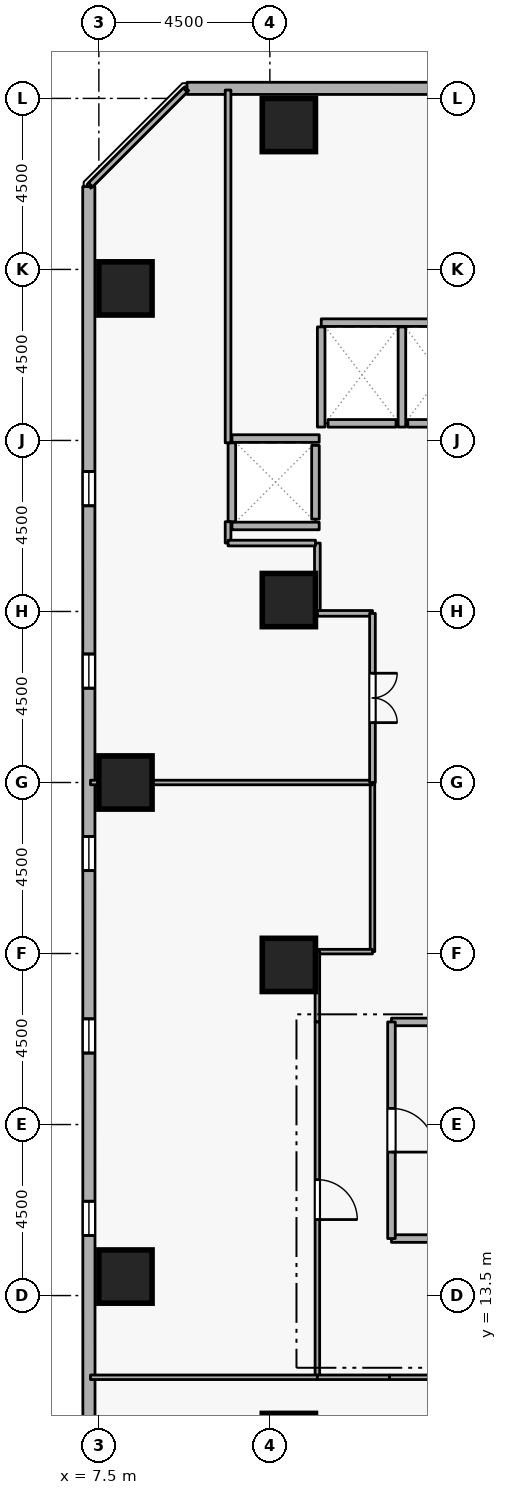
"""IFC4 building model, lengths in metres.
Left out: names, types, materials, properties, quantities, classifications, styles, units other than length and angle.
Written with IfcOpenShell. Run it as: python <this file> out.ifc"""

import sys

from ifc_helpers import new_model, si_unit, direction, frame, frame_2d, origin, origin_2d, place, context, subcontext, project, spatial, rectangle, extrude, element, fill, save


model = new_model("IFC4")
c1 = context("Model", 3, precision=1e-05, world=origin(), true_north=direction((0.0, 1.0)))
c2 = subcontext(c1, "Body", "Model", "MODEL_VIEW")
j1 = project(units=[si_unit("LENGTHUNIT", "METRE"), si_unit("PLANEANGLEUNIT", "RADIAN")], contexts=[c1])
p1 = place(None, origin())
s1 = spatial("IfcSite", under=j1, at=p1, CompositionType="ELEMENT")
p2 = place(p1, origin())
s2 = spatial("IfcBuilding", under=s1, at=p2, CompositionType="ELEMENT")
p3 = place(p2, frame((0.0, 0.0, 53.7)))
s3 = spatial("IfcBuildingStorey", under=s2, at=p3, CompositionType="ELEMENT", Elevation=53.7)
for number, where, z_axis, x_axis in (
    (1, (12.5, 9.7, 0.0), (0.0, 0.0, 1.0), (1.0, 0.0, 0.0)),
    (2, (12.5, 44.3, 0.0), (0.0, 0.0, 1.0), (1.0, 0.0, 0.0)),
    (3, (8.2, 14.0, 0.0), (0.0, 0.0, 1.0), (1.0, 0.0, 0.0)),
    (4, (8.2, 27.0, 0.0), (0.0, 0.0, 1.0), (1.0, 0.0, 0.0)),
    (5, (8.2, 40.0, 0.0), (0.0, 0.0, 1.0), (1.0, 0.0, 0.0)),
    (6, (12.5, 22.2, 0.0), (0.0, 0.0, 1.0), (1.0, 0.0, 0.0)),
    (7, (12.5, 31.8, 0.0), (0.0, 0.0, 1.0), (1.0, 0.0, 0.0)),
):
    element("IfcColumn", number, at=place(p3, frame(where, z_axis=z_axis, x_axis=x_axis)), inside=s3, PredefinedType="COLUMN", context=c2, shape_type="SweptSolid", body=[
        extrude(rectangle(XDim=1.4, YDim=1.4, at=origin_2d()), origin(), (0.0, 0.0, 1.0), 3.6),
    ])
p4 = place(p3, frame((45.877, 45.26, 0.0), z_axis=(0.0, 0.0, 1.0), x_axis=(-0.999999992574, 0.000121872777, 0.0)))
e8 = element("IfcWall", 8, at=p4, inside=s3, PredefinedType="STANDARD", context=c2, shape_type="SweptSolid", body=[
    extrude(rectangle(XDim=36.058, YDim=0.32, at=frame_2d((18.029, 0.0))), origin(), (0.0, 0.0, 1.0), 2.7),
])
p5 = place(p4, frame((2.7, 0.0, 0.72)))
e9 = element("IfcOpeningElement", 9, at=p5, cuts=e8, PredefinedType="OPENING", context=c2, shape_type="SweptSolid", body=[
    extrude(rectangle(XDim=0.9, YDim=1.75, at=frame_2d((0.45, 0.875))), frame((0.0, 0.17, 0.0), z_axis=(0.0, -1.0, 0.0), x_axis=(1.0, 0.0, 0.0)), (0.0, 0.0, 1.0), 0.34),
])
p6 = place(p4, frame((12.3, 0.0, 0.72)))
e10 = element("IfcOpeningElement", 10, at=p6, cuts=e8, PredefinedType="OPENING", context=c2, shape_type="SweptSolid", body=[
    extrude(rectangle(XDim=0.9, YDim=1.75, at=frame_2d((0.45, 0.875))), frame((0.0, 0.17, 0.0), z_axis=(0.0, -1.0, 0.0), x_axis=(1.0, 0.0, 0.0)), (0.0, 0.0, 1.0), 0.34),
])
p7 = place(p4, frame((17.1, 0.0, 0.72)))
e11 = element("IfcOpeningElement", 11, at=p7, cuts=e8, PredefinedType="OPENING", context=c2, shape_type="SweptSolid", body=[
    extrude(rectangle(XDim=0.9, YDim=1.75, at=frame_2d((0.45, 0.875))), frame((0.0, 0.17, 0.0), z_axis=(0.0, -1.0, 0.0), x_axis=(1.0, 0.0, 0.0)), (0.0, 0.0, 1.0), 0.34),
])
p8 = place(p4, frame((21.9, 0.0, 0.72)))
e12 = element("IfcOpeningElement", 12, at=p8, cuts=e8, PredefinedType="OPENING", context=c2, shape_type="SweptSolid", body=[
    extrude(rectangle(XDim=0.9, YDim=1.75, at=frame_2d((0.45, 0.875))), frame((0.0, 0.17, 0.0), z_axis=(0.0, -1.0, 0.0), x_axis=(1.0, 0.0, 0.0)), (0.0, 0.0, 1.0), 0.34),
])
p9 = place(p4, frame((26.7, 0.0, 0.72)))
e13 = element("IfcOpeningElement", 13, at=p9, cuts=e8, PredefinedType="OPENING", context=c2, shape_type="SweptSolid", body=[
    extrude(rectangle(XDim=0.9, YDim=1.75, at=frame_2d((0.45, 0.875))), frame((0.0, 0.17, 0.0), z_axis=(0.0, -1.0, 0.0), x_axis=(1.0, 0.0, 0.0)), (0.0, 0.0, 1.0), 0.34),
])
p10 = place(p3, frame((7.235, 42.681, 0.0), z_axis=(0.0, 0.0, 1.0), x_axis=(0.000121872777, -0.999999992574, 0.0)))
e14 = element("IfcWall", 14, at=p10, inside=s3, PredefinedType="STANDARD", context=c2, shape_type="SweptSolid", body=[
    extrude(rectangle(XDim=36.058, YDim=0.32, at=frame_2d((18.029, 0.0))), origin(), (0.0, 0.0, 1.0), 2.7),
])
p11 = place(p10, frame((7.5, 0.0, 0.72)))
e15 = element("IfcOpeningElement", 15, at=p11, cuts=e14, PredefinedType="OPENING", context=c2, shape_type="SweptSolid", body=[
    extrude(rectangle(XDim=0.9, YDim=1.75, at=frame_2d((0.45, 0.875))), frame((0.0, 0.17, 0.0), z_axis=(0.0, -1.0, 0.0), x_axis=(1.0, 0.0, 0.0)), (0.0, 0.0, 1.0), 0.34),
])
p12 = place(p10, frame((12.3, 0.0, 0.72)))
e16 = element("IfcOpeningElement", 16, at=p12, cuts=e14, PredefinedType="OPENING", context=c2, shape_type="SweptSolid", body=[
    extrude(rectangle(XDim=0.9, YDim=1.75, at=frame_2d((0.45, 0.875))), frame((0.0, 0.17, 0.0), z_axis=(0.0, -1.0, 0.0), x_axis=(1.0, 0.0, 0.0)), (0.0, 0.0, 1.0), 0.34),
])
p13 = place(p10, frame((17.1, 0.0, 0.72)))
e17 = element("IfcOpeningElement", 17, at=p13, cuts=e14, PredefinedType="OPENING", context=c2, shape_type="SweptSolid", body=[
    extrude(rectangle(XDim=0.9, YDim=1.75, at=frame_2d((0.45, 0.875))), frame((0.0, 0.17, 0.0), z_axis=(0.0, -1.0, 0.0), x_axis=(1.0, 0.0, 0.0)), (0.0, 0.0, 1.0), 0.34),
])
p14 = place(p10, frame((21.9, 0.0, 0.72)))
e18 = element("IfcOpeningElement", 18, at=p14, cuts=e14, PredefinedType="OPENING", context=c2, shape_type="SweptSolid", body=[
    extrude(rectangle(XDim=0.9, YDim=1.75, at=frame_2d((0.45, 0.875))), frame((0.0, 0.17, 0.0), z_axis=(0.0, -1.0, 0.0), x_axis=(1.0, 0.0, 0.0)), (0.0, 0.0, 1.0), 0.34),
])
p15 = place(p10, frame((26.7, 0.0, 0.72)))
e19 = element("IfcOpeningElement", 19, at=p15, cuts=e14, PredefinedType="OPENING", context=c2, shape_type="SweptSolid", body=[
    extrude(rectangle(XDim=0.9, YDim=1.75, at=frame_2d((0.45, 0.875))), frame((0.0, 0.17, 0.0), z_axis=(0.0, -1.0, 0.0), x_axis=(1.0, 0.0, 0.0)), (0.0, 0.0, 1.0), 0.34),
])
p16 = place(p3, frame((17.37, 36.45, 0.0), z_axis=(0.0, 0.0, 1.0), x_axis=(-1.0, 0.0, 0.0)))
e20 = element("IfcWall", 20, at=p16, inside=s3, PredefinedType="STANDARD", context=c2, shape_type="SweptSolid", body=[
    extrude(rectangle(XDim=1.74, YDim=0.2, at=frame_2d((0.87, 0.0))), origin(), (0.0, 0.0, 1.0), 3.34),
])
p17 = place(p3, frame((15.32, 36.45, 0.0), z_axis=(0.0, 0.0, 1.0), x_axis=(-1.0, 0.0, 0.0)))
e21 = element("IfcWall", 21, at=p17, inside=s3, PredefinedType="STANDARD", context=c2, shape_type="SweptSolid", body=[
    extrude(rectangle(XDim=1.79, YDim=0.2, at=frame_2d((0.895, 0.0))), origin(), (0.0, 0.0, 1.0), 3.34),
])
p18 = place(p3, frame((13.2, 33.93, 0.0), z_axis=(0.0, 0.0, 1.0), x_axis=(0.0, 1.0, 0.0)))
e22 = element("IfcWall", 22, at=p18, inside=s3, PredefinedType="STANDARD", context=c2, shape_type="SweptSolid", body=[
    extrude(rectangle(XDim=1.94, YDim=0.2, at=frame_2d((0.97, 0.0))), origin(), (0.0, 0.0, 1.0), 3.34),
])
p19 = place(p3, frame((13.352, 39.1, 0.0), z_axis=(0.0, 0.0, 1.0), x_axis=(1.0, 0.0, 0.0)))
e23 = element("IfcWall", 23, at=p19, inside=s3, PredefinedType="STANDARD", context=c2, shape_type="SweptSolid", body=[
    extrude(rectangle(XDim=4.196, YDim=0.2, at=frame_2d((2.098, 0.0))), origin(), (0.0, 0.0, 1.0), 3.34),
])
for number, where, z_axis, x_axis in (
    (24, (15.475, 36.352, 0.0), (0.0, 0.0, 1.0), (0.0, 1.0, 0.0)),
    (25, (13.35, 36.352, 0.0), (0.0, 0.0, 1.0), (0.0, 1.0, 0.0)),
):
    element("IfcWall", number, at=place(p3, frame(where, z_axis=z_axis, x_axis=x_axis)), inside=s3, PredefinedType="STANDARD", context=c2, shape_type="SweptSolid", body=[
        extrude(rectangle(XDim=2.636, YDim=0.2, at=frame_2d((1.318, 0.0))), origin(), (0.0, 0.0, 1.0), 3.34),
    ])
for number, where, z_axis, x_axis in (
    (26, (11.002, 36.05, 0.0), (0.0, 0.0, 1.0), (1.0, 0.0, 0.0)),
    (27, (11.002, 33.75, 0.0), (0.0, 0.0, 1.0), (1.0, 0.0, 0.0)),
):
    element("IfcWall", number, at=place(p3, frame(where, z_axis=z_axis, x_axis=x_axis)), inside=s3, PredefinedType="STANDARD", context=c2, shape_type="SweptSolid", body=[
        extrude(rectangle(XDim=2.296, YDim=0.2, at=frame_2d((1.148, 0.0))), origin(), (0.0, 0.0, 1.0), 3.34),
    ])
p20 = place(p3, frame((11.0, 33.862, 0.0), z_axis=(0.0, 0.0, 1.0), x_axis=(0.0, 1.0, 0.0)))
e28 = element("IfcWall", 28, at=p20, inside=s3, PredefinedType="STANDARD", context=c2, shape_type="SweptSolid", body=[
    extrude(rectangle(XDim=2.076, YDim=0.2, at=frame_2d((1.038, 0.0))), origin(), (0.0, 0.0, 1.0), 3.34),
])
for number, where, z_axis, x_axis in (
    (29, (15.2, 15.0, 0.0), (0.0, 0.0, 1.0), (1.0, 0.0, 0.0)),
    (30, (17.7, 20.7, 0.0), (0.0, 0.0, 1.0), (-1.0, 0.0, 0.0)),
):
    element("IfcWall", number, at=place(p3, frame(where, z_axis=z_axis, x_axis=x_axis)), inside=s3, PredefinedType="STANDARD", context=c2, shape_type="SweptSolid", body=[
        extrude(rectangle(XDim=2.5, YDim=0.2, at=frame_2d((1.25, 0.0))), origin(), (0.0, 0.0, 1.0), 3.34),
    ])
p21 = place(p3, frame((15.2, 20.7, 0.0), z_axis=(0.0, 0.0, 1.0), x_axis=(0.0, -1.0, 0.0)))
e31 = element("IfcWall", 31, at=p21, inside=s3, PredefinedType="STANDARD", context=c2, shape_type="SweptSolid", body=[
    extrude(rectangle(XDim=5.7, YDim=0.2, at=frame_2d((2.85, 0.0))), origin(), (0.0, 0.0, 1.0), 3.34),
])
p22 = place(p21, frame((2.275, 0.0, 0.0)))
e32 = element("IfcOpeningElement", 32, at=p22, cuts=e31, PredefinedType="OPENING", context=c2, shape_type="SweptSolid", body=[
    extrude(rectangle(XDim=1.15, YDim=2.1, at=frame_2d((0.575, 1.05))), frame((0.0, 0.11, 0.0), z_axis=(0.0, -1.0, 0.0), x_axis=(1.0, 0.0, 0.0)), (0.0, 0.0, 1.0), 0.22),
])
p23 = place(p3, frame((14.7, 27.0, 0.0), z_axis=(0.0, 0.0, 1.0), x_axis=(0.0, -1.0, 0.0)))
e33 = element("IfcWall", 33, at=p23, inside=s3, PredefinedType="PARTITIONING", context=c2, shape_type="SweptSolid", body=[
    extrude(rectangle(XDim=4.45, YDim=0.12, at=frame_2d((2.225, 0.0))), origin(), (0.0, 0.0, 1.0), 3.34),
])
p24 = place(p3, frame((14.7, 22.55, 0.0), z_axis=(0.0, 0.0, 1.0), x_axis=(-1.0, 0.0, 0.0)))
e34 = element("IfcWall", 34, at=p24, inside=s3, PredefinedType="PARTITIONING", context=c2, shape_type="SweptSolid", body=[
    extrude(rectangle(XDim=1.45, YDim=0.12, at=frame_2d((0.725, 0.0))), origin(), (0.0, 0.0, 1.0), 3.34),
])
p25 = place(p3, frame((13.25, 22.55, 0.0), z_axis=(0.0, 0.0, 1.0), x_axis=(0.0, -1.0, 0.0)))
e35 = element("IfcWall", 35, at=p25, inside=s3, PredefinedType="PARTITIONING", context=c2, shape_type="SweptSolid", body=[
    extrude(rectangle(XDim=1.85, YDim=0.12, at=frame_2d((0.925, 0.0))), origin(), (0.0, 0.0, 1.0), 3.34),
])
p26 = place(p3, frame((13.25, 20.7, 0.0), z_axis=(0.0, 0.0, 1.0), x_axis=(0.0, -1.0, 0.0)))
e36 = element("IfcWall", 36, at=p26, inside=s3, PredefinedType="PARTITIONING", context=c2, shape_type="SweptSolid", body=[
    extrude(rectangle(XDim=9.35, YDim=0.12, at=frame_2d((4.675, 0.0))), origin(), (0.0, 0.0, 1.0), 3.34),
])
p27 = place(p26, frame((4.15, 0.0, 0.0)))
e37 = element("IfcOpeningElement", 37, at=p27, cuts=e36, PredefinedType="OPENING", context=c2, shape_type="SweptSolid", body=[
    extrude(rectangle(XDim=1.05, YDim=2.1, at=frame_2d((0.525, 1.05))), frame((0.0, 0.07, 0.0), z_axis=(0.0, -1.0, 0.0), x_axis=(1.0, 0.0, 0.0)), (0.0, 0.0, 1.0), 0.14),
])
p28 = place(p3, frame((13.25, 11.35, 0.0), z_axis=(0.0, 0.0, 1.0), x_axis=(-1.0, 0.0, 0.0)))
e38 = element("IfcWall", 38, at=p28, inside=s3, PredefinedType="PARTITIONING", context=c2, shape_type="SweptSolid", body=[
    extrude(rectangle(XDim=5.97, YDim=0.12, at=frame_2d((2.985, 0.0))), origin(), (0.0, 0.0, 1.0), 3.34),
])
p29 = place(p3, frame((7.28, 27.0, 0.0), z_axis=(0.0, 0.0, 1.0), x_axis=(1.0, 0.0, 0.0)))
e39 = element("IfcWall", 39, at=p29, inside=s3, PredefinedType="PARTITIONING", context=c2, shape_type="SweptSolid", body=[
    extrude(rectangle(XDim=7.42, YDim=0.12, at=frame_2d((3.71, 0.0))), origin(), (0.0, 0.0, 1.0), 2.932),
])
p30 = place(p3, frame((13.25, 33.3, 0.0), z_axis=(0.0, 0.0, 1.0), x_axis=(0.0, -1.0, 0.0)))
e40 = element("IfcWall", 40, at=p30, inside=s3, PredefinedType="PARTITIONING", context=c2, shape_type="SweptSolid", body=[
    extrude(rectangle(XDim=1.85, YDim=0.15, at=frame_2d((0.925, 0.0))), origin(), (0.0, 0.0, 1.0), 3.34),
])
p31 = place(p3, frame((13.25, 31.45, 0.0), z_axis=(0.0, 0.0, 1.0), x_axis=(1.0, 0.0, 0.0)))
e41 = element("IfcWall", 41, at=p31, inside=s3, PredefinedType="PARTITIONING", context=c2, shape_type="SweptSolid", body=[
    extrude(rectangle(XDim=1.45, YDim=0.15, at=frame_2d((0.725, 0.0))), origin(), (0.0, 0.0, 1.0), 3.34),
])
p32 = place(p3, frame((14.7, 31.45, 0.0), z_axis=(0.0, 0.0, 1.0), x_axis=(0.0, -1.0, 0.0)))
e42 = element("IfcWall", 42, at=p32, inside=s3, PredefinedType="PARTITIONING", context=c2, shape_type="SweptSolid", body=[
    extrude(rectangle(XDim=4.45, YDim=0.15, at=frame_2d((2.225, 0.0))), origin(), (0.0, 0.0, 1.0), 3.34),
])
p33 = place(p32, frame((1.575, 0.0, 0.0)))
e43 = element("IfcOpeningElement", 43, at=p33, cuts=e42, PredefinedType="OPENING", context=c2, shape_type="SweptSolid", body=[
    extrude(rectangle(XDim=1.3, YDim=2.12, at=frame_2d((0.65, 1.06))), frame((0.0, 0.085, 0.0), z_axis=(0.0, -1.0, 0.0), x_axis=(1.0, 0.0, 0.0)), (0.0, 0.0, 1.0), 0.17),
])
p34 = place(p3, frame((7.28, 42.725, 0.0), z_axis=(0.0, 0.0, 1.0), x_axis=(0.707106781187, 0.707106781187, 0.0)))
e44 = element("IfcWall", 44, at=p34, inside=s3, PredefinedType="PARTITIONING", context=c2, shape_type="SweptSolid", body=[
    extrude(rectangle(XDim=3.528, YDim=0.15, at=frame_2d((1.764, 0.0))), origin(), (0.0, 0.0, 1.0), 3.34),
])
p35 = place(p3, frame((10.9, 45.22, 0.0), z_axis=(0.0, 0.0, 1.0), x_axis=(0.0, -1.0, 0.0)))
e45 = element("IfcWall", 45, at=p35, inside=s3, PredefinedType="PARTITIONING", context=c2, shape_type="SweptSolid", body=[
    extrude(rectangle(XDim=9.282, YDim=0.15, at=frame_2d((4.641, 0.0))), origin(), (0.0, 0.0, 1.0), 3.34),
])
p36 = place(p3, frame((10.9, 33.862, 0.0), z_axis=(0.0, 0.0, 1.0), x_axis=(0.0, -1.0, 0.0)))
e46 = element("IfcWall", 46, at=p36, inside=s3, PredefinedType="PARTITIONING", context=c2, shape_type="SweptSolid", body=[
    extrude(rectangle(XDim=0.562, YDim=0.15, at=frame_2d((0.281, 0.0))), origin(), (0.0, 0.0, 1.0), 3.34),
])
p37 = place(p3, frame((10.9, 33.3, 0.0), z_axis=(0.0, 0.0, 1.0), x_axis=(1.0, 0.0, 0.0)))
e47 = element("IfcWall", 47, at=p37, inside=s3, PredefinedType="PARTITIONING", context=c2, shape_type="SweptSolid", body=[
    extrude(rectangle(XDim=2.3, YDim=0.15, at=frame_2d((1.15, 0.0))), origin(), (0.0, 0.0, 1.0), 3.34),
])
p38 = place(p3, frame((13.25, 11.35, 0.0), z_axis=(0.0, 0.0, 1.0), x_axis=(1.0, 0.0, 0.0)))
e48 = element("IfcWall", 48, at=p38, inside=s3, PredefinedType="PARTITIONING", context=c2, shape_type="SweptSolid", body=[
    extrude(rectangle(XDim=1.9, YDim=0.12, at=frame_2d((0.95, 0.0))), origin(), (0.0, 0.0, 1.0), 3.34),
])
p39 = place(p3, frame((15.15, 11.35, 0.0), z_axis=(0.0, 0.0, 1.0), x_axis=(1.0, 0.0, 0.0)))
e49 = element("IfcWall", 49, at=p39, inside=s3, PredefinedType="PARTITIONING", context=c2, shape_type="SweptSolid", body=[
    extrude(rectangle(XDim=10.35, YDim=0.12, at=frame_2d((5.175, 0.0))), origin(), (0.0, 0.0, 1.0), 3.34),
])
p40 = place(p39, frame((4.65, 0.0, 0.0)))
e50 = element("IfcOpeningElement", 50, at=p40, cuts=e49, PredefinedType="OPENING", context=c2, shape_type="SweptSolid", body=[
    extrude(rectangle(XDim=1.05, YDim=2.1, at=frame_2d((0.525, 1.05))), frame((0.0, 0.07, 0.0), z_axis=(0.0, -1.0, 0.0), x_axis=(1.0, 0.0, 0.0)), (0.0, 0.0, 1.0), 0.14),
])
p41 = place(p11, origin())
e51 = element("IfcWindow", 51, at=p41, inside=s3, PartitioningType="SINGLE_PANEL", PredefinedType="WINDOW", context=c2, shape_type="SweptSolid", body=[
    extrude(rectangle(XDim=0.9, YDim=1.75, at=frame_2d((0.45, 0.875))), frame((0.0, 0.03, 0.0), z_axis=(0.0, -1.0, 0.0), x_axis=(1.0, 0.0, 0.0)), (0.0, 0.0, 1.0), 0.06),
])
fill(e15, e51)
p42 = place(p12, origin())
e52 = element("IfcWindow", 52, at=p42, inside=s3, PartitioningType="SINGLE_PANEL", PredefinedType="WINDOW", context=c2, shape_type="SweptSolid", body=[
    extrude(rectangle(XDim=0.9, YDim=1.75, at=frame_2d((0.45, 0.875))), frame((0.0, 0.03, 0.0), z_axis=(0.0, -1.0, 0.0), x_axis=(1.0, 0.0, 0.0)), (0.0, 0.0, 1.0), 0.06),
])
fill(e16, e52)
p43 = place(p13, origin())
e53 = element("IfcWindow", 53, at=p43, inside=s3, PartitioningType="SINGLE_PANEL", PredefinedType="WINDOW", context=c2, shape_type="SweptSolid", body=[
    extrude(rectangle(XDim=0.9, YDim=1.75, at=frame_2d((0.45, 0.875))), frame((0.0, 0.03, 0.0), z_axis=(0.0, -1.0, 0.0), x_axis=(1.0, 0.0, 0.0)), (0.0, 0.0, 1.0), 0.06),
])
fill(e17, e53)
p44 = place(p14, origin())
e54 = element("IfcWindow", 54, at=p44, inside=s3, PartitioningType="SINGLE_PANEL", PredefinedType="WINDOW", context=c2, shape_type="SweptSolid", body=[
    extrude(rectangle(XDim=0.9, YDim=1.75, at=frame_2d((0.45, 0.875))), frame((0.0, 0.03, 0.0), z_axis=(0.0, -1.0, 0.0), x_axis=(1.0, 0.0, 0.0)), (0.0, 0.0, 1.0), 0.06),
])
fill(e18, e54)
p45 = place(p15, origin())
e55 = element("IfcWindow", 55, at=p45, inside=s3, PartitioningType="SINGLE_PANEL", PredefinedType="WINDOW", context=c2, shape_type="SweptSolid", body=[
    extrude(rectangle(XDim=0.9, YDim=1.75, at=frame_2d((0.45, 0.875))), frame((0.0, 0.03, 0.0), z_axis=(0.0, -1.0, 0.0), x_axis=(1.0, 0.0, 0.0)), (0.0, 0.0, 1.0), 0.06),
])
fill(e19, e55)
p46 = place(p22, origin())
e56 = element("IfcDoor", 56, at=p46, inside=s3, OperationType="SINGLE_SWING_RIGHT", PredefinedType="DOOR", context=c2, shape_type="SweptSolid", body=[
    extrude(rectangle(XDim=1.15, YDim=2.1, at=frame_2d((0.575, 1.05))), frame((0.0, 0.025, 0.0), z_axis=(0.0, -1.0, 0.0), x_axis=(1.0, 0.0, 0.0)), (0.0, 0.0, 1.0), 0.05),
])
fill(e32, e56)
p47 = place(p27, origin())
e57 = element("IfcDoor", 57, at=p47, inside=s3, OperationType="SINGLE_SWING_RIGHT", PredefinedType="DOOR", context=c2, shape_type="SweptSolid", body=[
    extrude(rectangle(XDim=1.05, YDim=2.1, at=frame_2d((0.525, 1.05))), frame((0.0, 0.025, 0.0), z_axis=(0.0, -1.0, 0.0), x_axis=(1.0, 0.0, 0.0)), (0.0, 0.0, 1.0), 0.05),
])
fill(e37, e57)
p48 = place(p33, origin())
e58 = element("IfcDoor", 58, at=p48, inside=s3, OperationType="DOUBLE_DOOR_SINGLE_SWING", PredefinedType="DOOR", context=c2, shape_type="SweptSolid", body=[
    extrude(rectangle(XDim=1.3, YDim=2.12, at=frame_2d((0.65, 1.06))), frame((0.0, 0.025, 0.0), z_axis=(0.0, -1.0, 0.0), x_axis=(1.0, 0.0, 0.0)), (0.0, 0.0, 1.0), 0.05),
])
fill(e43, e58)
save(model, sys.argv[1])
